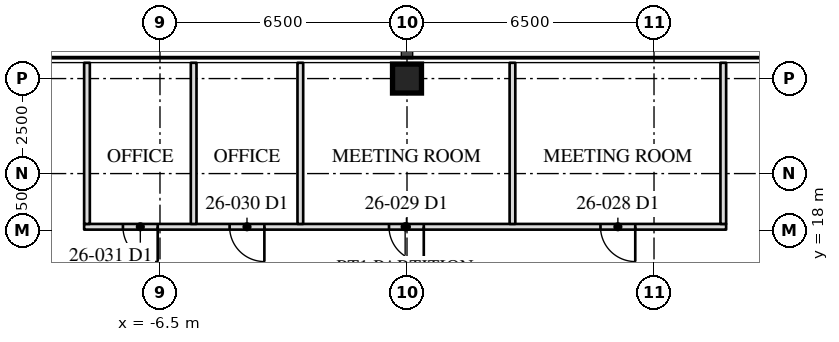
"""IFC4 building model, lengths in metres.
Left out: names, types, materials, properties, quantities, classifications, styles, units other than length and angle.
Written with IfcOpenShell. Run it as: python <this file> out.ifc"""

import sys

from ifc_helpers import new_model, si_unit, direction, frame, frame_2d, origin, origin_2d, place, context, subcontext, project, spatial, rectangle, hollow_rectangle, extrude, element, fill, save


model = new_model("IFC4")
c1 = context("Model", 3, precision=1e-05, world=origin(), true_north=direction((0.0, 1.0)))
c2 = subcontext(c1, "Body", "Model", "MODEL_VIEW")
j1 = project(units=[si_unit("LENGTHUNIT", "METRE"), si_unit("PLANEANGLEUNIT", "RADIAN")], contexts=[c1])
p1 = place(None, origin())
s1 = spatial("IfcSite", under=j1, at=p1, CompositionType="ELEMENT")
p2 = place(p1, origin())
s2 = spatial("IfcBuilding", under=s1, at=p2, CompositionType="ELEMENT")
p3 = place(p2, frame((0.0, 0.0, 113.1)))
s3 = spatial("IfcBuildingStorey", under=s2, at=p3, CompositionType="ELEMENT", Elevation=113.1)
p4 = place(p3, frame((0.0, 22.0, 0.0), z_axis=(0.0, 0.0, 1.0), x_axis=(1.0, 0.0, 0.0)))
e1 = element("IfcColumn", 1, at=p4, inside=s3, PredefinedType="COLUMN", context=c2, shape_type="SweptSolid", body=[
    extrude(hollow_rectangle(XDim=0.762, YDim=0.762, WallThickness=0.127, at=origin_2d()), origin(), (0.0, 0.0, 1.0), 4.1),
])
p5 = place(p3, frame((8.398, 18.1, 0.0), z_axis=(0.0, 0.0, 1.0), x_axis=(-1.0, 0.0, 0.0)))
e2 = element("IfcWall", 2, at=p5, inside=s3, PredefinedType="PARTITIONING", context=c2, shape_type="SweptSolid", body=[
    extrude(rectangle(XDim=16.894, YDim=0.15, at=frame_2d((8.447, 0.0))), origin(), (0.0, 0.0, 1.0), 3.91),
])
p6 = place(p5, frame((2.392, 0.0, 0.0)))
e3 = element("IfcOpeningElement", 3, at=p6, cuts=e2, PredefinedType="OPENING", context=c2, shape_type="SweptSolid", body=[
    extrude(rectangle(XDim=0.915, YDim=2.134, at=frame_2d((0.458, 1.067))), frame((0.0, 0.085, 0.0), z_axis=(0.0, -1.0, 0.0), x_axis=(1.0, 0.0, 0.0)), (0.0, 0.0, 1.0), 0.17),
])
p7 = place(p5, frame((7.957, 0.0, 0.0)))
e4 = element("IfcOpeningElement", 4, at=p7, cuts=e2, PredefinedType="OPENING", context=c2, shape_type="SweptSolid", body=[
    extrude(rectangle(XDim=0.915, YDim=2.134, at=frame_2d((0.458, 1.067))), frame((0.0, 0.085, 0.0), z_axis=(0.0, -1.0, 0.0), x_axis=(1.0, 0.0, 0.0)), (0.0, 0.0, 1.0), 0.17),
])
p8 = place(p5, frame((12.151, 0.0, 0.0)))
e5 = element("IfcOpeningElement", 5, at=p8, cuts=e2, PredefinedType="OPENING", context=c2, shape_type="SweptSolid", body=[
    extrude(rectangle(XDim=0.915, YDim=2.134, at=frame_2d((0.458, 1.067))), frame((0.0, 0.085, 0.0), z_axis=(0.0, -1.0, 0.0), x_axis=(1.0, 0.0, 0.0)), (0.0, 0.0, 1.0), 0.17),
])
p9 = place(p5, frame((14.958, 0.0, 0.0)))
e6 = element("IfcOpeningElement", 6, at=p9, cuts=e2, PredefinedType="OPENING", context=c2, shape_type="SweptSolid", body=[
    extrude(rectangle(XDim=0.915, YDim=2.134, at=frame_2d((0.458, 1.067))), frame((0.0, 0.085, 0.0), z_axis=(0.0, -1.0, 0.0), x_axis=(1.0, 0.0, 0.0)), (0.0, 0.0, 1.0), 0.17),
])
for number, where, z_axis, x_axis in (
    (7, (8.323, 18.175, 0.0), (0.0, 0.0, 1.0), (0.0, 1.0, 0.0)),
    (8, (2.775, 18.175, 0.0), (0.0, 0.0, 1.0), (0.0, 1.0, 0.0)),
    (9, (-2.807, 18.175, 0.0), (0.0, 0.0, 1.0), (0.0, 1.0, 0.0)),
    (10, (-5.614, 18.175, 0.0), (0.0, 0.0, 1.0), (0.0, 1.0, 0.0)),
    (11, (-8.421, 18.175, 0.0), (0.0, 0.0, 1.0), (0.0, 1.0, 0.0)),
):
    element("IfcWall", number, at=place(p3, frame(where, z_axis=z_axis, x_axis=x_axis)), inside=s3, PredefinedType="PARTITIONING", context=c2, shape_type="SweptSolid", body=[
        extrude(rectangle(XDim=4.24, YDim=0.15, at=frame_2d((2.12, 0.0))), origin(), (0.0, 0.0, 1.0), 3.91),
    ])
p10 = place(p6, origin())
e12 = element("IfcDoor", 12, at=p10, inside=s3, OperationType="SINGLE_SWING_LEFT", PredefinedType="DOOR", context=c2, shape_type="SweptSolid", body=[
    extrude(rectangle(XDim=0.915, YDim=2.134, at=frame_2d((0.458, 1.067))), frame((0.0, 0.025, 0.0), z_axis=(0.0, -1.0, 0.0), x_axis=(1.0, 0.0, 0.0)), (0.0, 0.0, 1.0), 0.05),
])
fill(e3, e12)
p11 = place(p7, origin())
e13 = element("IfcDoor", 13, at=p11, inside=s3, OperationType="SINGLE_SWING_LEFT", PredefinedType="DOOR", context=c2, shape_type="SweptSolid", body=[
    extrude(rectangle(XDim=0.915, YDim=2.134, at=frame_2d((0.458, 1.067))), frame((0.0, 0.025, 0.0), z_axis=(0.0, -1.0, 0.0), x_axis=(1.0, 0.0, 0.0)), (0.0, 0.0, 1.0), 0.05),
])
fill(e4, e13)
p12 = place(p8, origin())
e14 = element("IfcDoor", 14, at=p12, inside=s3, OperationType="SINGLE_SWING_LEFT", PredefinedType="DOOR", context=c2, shape_type="SweptSolid", body=[
    extrude(rectangle(XDim=0.915, YDim=2.134, at=frame_2d((0.458, 1.067))), frame((0.0, 0.025, 0.0), z_axis=(0.0, -1.0, 0.0), x_axis=(1.0, 0.0, 0.0)), (0.0, 0.0, 1.0), 0.05),
])
fill(e5, e14)
p13 = place(p9, origin())
e15 = element("IfcDoor", 15, at=p13, inside=s3, OperationType="SINGLE_SWING_LEFT", PredefinedType="DOOR", context=c2, shape_type="SweptSolid", body=[
    extrude(rectangle(XDim=0.915, YDim=2.134, at=frame_2d((0.458, 1.067))), frame((0.0, 0.025, 0.0), z_axis=(0.0, -1.0, 0.0), x_axis=(1.0, 0.0, 0.0)), (0.0, 0.0, 1.0), 0.05),
])
fill(e6, e15)
save(model, sys.argv[1])
